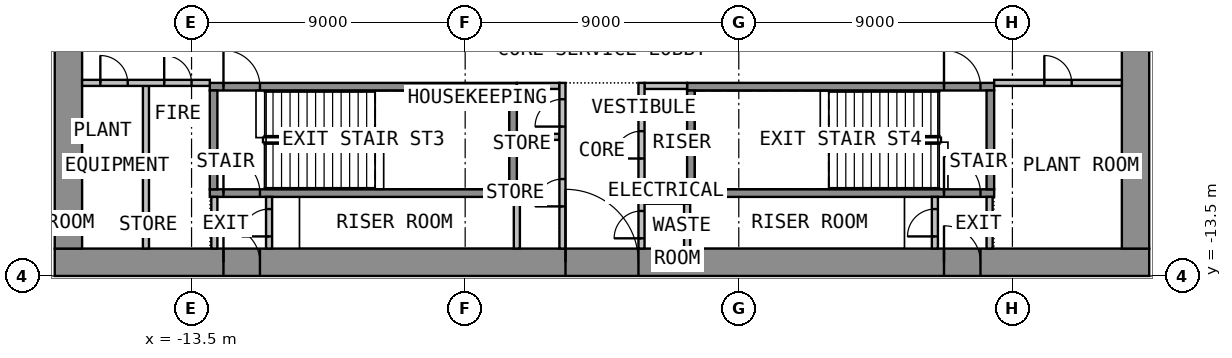
"""IFC4 building model, lengths in metres.
Left out: names, types, materials, properties, quantities, classifications, styles, units other than length and angle.
Written with IfcOpenShell. Run it as: python <this file> out.ifc"""

import sys

from ifc_helpers import new_model, si_unit, direction, frame, frame_2d, origin, place, context, subcontext, project, spatial, rectangle, extrude, element, fill, save


model = new_model("IFC4")
c1 = context("Model", 3, precision=1e-05, world=origin(), true_north=direction((0.0, 1.0)))
c2 = subcontext(c1, "Body", "Model", "MODEL_VIEW")
j1 = project(units=[si_unit("LENGTHUNIT", "METRE"), si_unit("PLANEANGLEUNIT", "RADIAN")], contexts=[c1])
p1 = place(None, origin())
s1 = spatial("IfcSite", under=j1, at=p1, CompositionType="ELEMENT")
p2 = place(p1, origin())
s2 = spatial("IfcBuilding", under=s1, at=p2, CompositionType="ELEMENT")
p3 = place(p2, frame((0.0, 0.0, 6.0)))
s3 = spatial("IfcBuildingStorey", under=s2, at=p3, CompositionType="ELEMENT", Elevation=6.0)
p4 = place(p3, frame((-18.0, -13.05, 0.0), z_axis=(0.0, 0.0, 1.0), x_axis=(1.0, 0.0, 0.0)))
e1 = element("IfcWall", 1, at=p4, inside=s3, PredefinedType="SHEAR", context=c2, shape_type="SweptSolid", body=[
    extrude(rectangle(XDim=36.0, YDim=0.9, at=frame_2d((18.0, 0.0))), origin(), (0.0, 0.0, 1.0), 4.4),
])
p5 = place(p4, frame((16.8, 0.0, 0.0)))
e2 = element("IfcOpeningElement", 2, at=p5, cuts=e1, PredefinedType="OPENING", context=c2, shape_type="SweptSolid", body=[
    extrude(rectangle(XDim=2.4, YDim=2.1, at=frame_2d((1.2, 1.05))), frame((0.0, 0.46, 0.0), z_axis=(0.0, -1.0, 0.0), x_axis=(1.0, 0.0, 0.0)), (0.0, 0.0, 1.0), 0.92),
])
p6 = place(p4, frame((5.55, 0.0, 0.0)))
e3 = element("IfcOpeningElement", 3, at=p6, cuts=e1, PredefinedType="OPENING", context=c2, shape_type="SweptSolid", body=[
    extrude(rectangle(XDim=1.2, YDim=2.1, at=frame_2d((0.6, 1.05))), frame((0.0, 0.46, 0.0), z_axis=(0.0, -1.0, 0.0), x_axis=(1.0, 0.0, 0.0)), (0.0, 0.0, 1.0), 0.92),
])
p7 = place(p4, frame((29.25, 0.0, 0.0)))
e4 = element("IfcOpeningElement", 4, at=p7, cuts=e1, PredefinedType="OPENING", context=c2, shape_type="SweptSolid", body=[
    extrude(rectangle(XDim=1.2, YDim=2.1, at=frame_2d((0.6, 1.05))), frame((0.0, 0.46, 0.0), z_axis=(0.0, -1.0, 0.0), x_axis=(1.0, 0.0, 0.0)), (0.0, 0.0, 1.0), 0.92),
])
p8 = place(p3, frame((-17.55, -12.6, 0.0), z_axis=(0.0, 0.0, 1.0), x_axis=(0.0, 1.0, 0.0)))
e5 = element("IfcWall", 5, at=p8, inside=s3, PredefinedType="SHEAR", context=c2, shape_type="SweptSolid", body=[
    extrude(rectangle(XDim=25.2, YDim=0.9, at=frame_2d((12.6, 0.0))), origin(), (0.0, 0.0, 1.0), 4.4),
])
p9 = place(p8, frame((11.4, 0.0, 0.0)))
e6 = element("IfcOpeningElement", 6, at=p9, cuts=e5, PredefinedType="OPENING", context=c2, shape_type="SweptSolid", body=[
    extrude(rectangle(XDim=2.4, YDim=2.1, at=frame_2d((1.2, 1.05))), frame((0.0, 0.46, 0.0), z_axis=(0.0, -1.0, 0.0), x_axis=(1.0, 0.0, 0.0)), (0.0, 0.0, 1.0), 0.92),
])
p10 = place(p3, frame((17.55, -12.6, 0.0), z_axis=(0.0, 0.0, 1.0), x_axis=(0.0, 1.0, 0.0)))
e7 = element("IfcWall", 7, at=p10, inside=s3, PredefinedType="SHEAR", context=c2, shape_type="SweptSolid", body=[
    extrude(rectangle(XDim=25.2, YDim=0.9, at=frame_2d((12.6, 0.0))), origin(), (0.0, 0.0, 1.0), 4.4),
])
p11 = place(p10, frame((11.4, 0.0, 0.0)))
e8 = element("IfcOpeningElement", 8, at=p11, cuts=e7, PredefinedType="OPENING", context=c2, shape_type="SweptSolid", body=[
    extrude(rectangle(XDim=2.4, YDim=2.1, at=frame_2d((1.2, 1.05))), frame((0.0, 0.46, 0.0), z_axis=(0.0, -1.0, 0.0), x_axis=(1.0, 0.0, 0.0)), (0.0, 0.0, 1.0), 0.92),
])
p12 = place(p3, frame((-12.9, -10.775, 0.0), z_axis=(0.0, 0.0, 1.0), x_axis=(1.0, 0.0, 0.0)))
e9 = element("IfcWall", 9, at=p12, inside=s3, PredefinedType="SHEAR", context=c2, shape_type="SweptSolid", body=[
    extrude(rectangle(XDim=10.1, YDim=0.25, at=frame_2d((5.05, 0.0))), origin(), (0.0, 0.0, 1.0), 4.4),
])
p13 = place(p12, frame((0.45, 0.0, 0.0)))
e10 = element("IfcOpeningElement", 10, at=p13, cuts=e9, PredefinedType="OPENING", context=c2, shape_type="SweptSolid", body=[
    extrude(rectangle(XDim=1.2, YDim=2.1, at=frame_2d((0.6, 1.05))), frame((0.0, 0.135, 0.0), z_axis=(0.0, -1.0, 0.0), x_axis=(1.0, 0.0, 0.0)), (0.0, 0.0, 1.0), 0.27),
])
p14 = place(p3, frame((-12.9, -7.275, 0.0), z_axis=(0.0, 0.0, 1.0), x_axis=(1.0, 0.0, 0.0)))
e11 = element("IfcWall", 11, at=p14, inside=s3, PredefinedType="SHEAR", context=c2, shape_type="SweptSolid", body=[
    extrude(rectangle(XDim=10.1, YDim=0.25, at=frame_2d((5.05, 0.0))), origin(), (0.0, 0.0, 1.0), 4.4),
])
p15 = place(p14, frame((0.45, 0.0, 0.0)))
e12 = element("IfcOpeningElement", 12, at=p15, cuts=e11, PredefinedType="OPENING", context=c2, shape_type="SweptSolid", body=[
    extrude(rectangle(XDim=1.2, YDim=2.1, at=frame_2d((0.6, 1.05))), frame((0.0, 0.135, 0.0), z_axis=(0.0, -1.0, 0.0), x_axis=(1.0, 0.0, 0.0)), (0.0, 0.0, 1.0), 0.27),
])
for number, where, z_axis, x_axis in (
    (13, (-12.775, -10.65, 0.0), (0.0, 0.0, 1.0), (0.0, 1.0, 0.0)),
    (14, (-2.925, -10.65, 0.0), (0.0, 0.0, 1.0), (0.0, 1.0, 0.0)),
):
    element("IfcWall", number, at=place(p3, frame(where, z_axis=z_axis, x_axis=x_axis)), inside=s3, PredefinedType="SHEAR", context=c2, shape_type="SweptSolid", body=[
        extrude(rectangle(XDim=3.25, YDim=0.25, at=frame_2d((1.625, 0.0))), origin(), (0.0, 0.0, 1.0), 4.4),
    ])
p16 = place(p3, frame((2.8, -10.775, 0.0), z_axis=(0.0, 0.0, 1.0), x_axis=(1.0, 0.0, 0.0)))
e15 = element("IfcWall", 15, at=p16, inside=s3, PredefinedType="SHEAR", context=c2, shape_type="SweptSolid", body=[
    extrude(rectangle(XDim=10.1, YDim=0.25, at=frame_2d((5.05, 0.0))), origin(), (0.0, 0.0, 1.0), 4.4),
])
p17 = place(p16, frame((8.45, 0.0, 0.0)))
e16 = element("IfcOpeningElement", 16, at=p17, cuts=e15, PredefinedType="OPENING", context=c2, shape_type="SweptSolid", body=[
    extrude(rectangle(XDim=1.2, YDim=2.1, at=frame_2d((0.6, 1.05))), frame((0.0, 0.135, 0.0), z_axis=(0.0, -1.0, 0.0), x_axis=(1.0, 0.0, 0.0)), (0.0, 0.0, 1.0), 0.27),
])
p18 = place(p3, frame((2.8, -7.275, 0.0), z_axis=(0.0, 0.0, 1.0), x_axis=(1.0, 0.0, 0.0)))
e17 = element("IfcWall", 17, at=p18, inside=s3, PredefinedType="SHEAR", context=c2, shape_type="SweptSolid", body=[
    extrude(rectangle(XDim=10.1, YDim=0.25, at=frame_2d((5.05, 0.0))), origin(), (0.0, 0.0, 1.0), 4.4),
])
p19 = place(p18, frame((8.45, 0.0, 0.0)))
e18 = element("IfcOpeningElement", 18, at=p19, cuts=e17, PredefinedType="OPENING", context=c2, shape_type="SweptSolid", body=[
    extrude(rectangle(XDim=1.2, YDim=2.1, at=frame_2d((0.6, 1.05))), frame((0.0, 0.135, 0.0), z_axis=(0.0, -1.0, 0.0), x_axis=(1.0, 0.0, 0.0)), (0.0, 0.0, 1.0), 0.27),
])
for number, where, z_axis, x_axis in (
    (19, (2.925, -10.65, 0.0), (0.0, 0.0, 1.0), (0.0, 1.0, 0.0)),
    (20, (12.775, -10.65, 0.0), (0.0, 0.0, 1.0), (0.0, 1.0, 0.0)),
):
    element("IfcWall", number, at=place(p3, frame(where, z_axis=z_axis, x_axis=x_axis)), inside=s3, PredefinedType="SHEAR", context=c2, shape_type="SweptSolid", body=[
        extrude(rectangle(XDim=3.25, YDim=0.25, at=frame_2d((1.625, 0.0))), origin(), (0.0, 0.0, 1.0), 4.4),
    ])
for number, where, z_axis, x_axis in (
    (21, (-2.8, -7.25, 0.0), (0.0, 0.0, 1.0), (1.0, 0.0, 0.0)),
    (22, (-2.8, -8.925, 0.0), (0.0, 0.0, 1.0), (1.0, 0.0, 0.0)),
    (23, (1.4, -7.25, 0.0), (0.0, 0.0, 1.0), (1.0, 0.0, 0.0)),
    (24, (1.4, -11.025, 0.0), (0.0, 0.0, 1.0), (1.0, 0.0, 0.0)),
):
    element("IfcWall", number, at=place(p3, frame(where, z_axis=z_axis, x_axis=x_axis)), inside=s3, PredefinedType="PARTITIONING", context=c2, shape_type="SweptSolid", body=[
        extrude(rectangle(XDim=1.4, YDim=0.2, at=frame_2d((0.7, 0.0))), origin(), (0.0, 0.0, 1.0), 4.4),
    ])
p20 = place(p3, frame((-1.3, -12.6, 0.0), z_axis=(0.0, 0.0, 1.0), x_axis=(0.0, 1.0, 0.0)))
e25 = element("IfcWall", 25, at=p20, inside=s3, PredefinedType="PARTITIONING", context=c2, shape_type="SweptSolid", body=[
    extrude(rectangle(XDim=5.45, YDim=0.2, at=frame_2d((2.725, 0.0))), origin(), (0.0, 0.0, 1.0), 4.4),
])
p21 = place(p20, frame((1.387, 0.0, 0.0)))
e26 = element("IfcOpeningElement", 26, at=p21, cuts=e25, PredefinedType="OPENING", context=c2, shape_type="SweptSolid", body=[
    extrude(rectangle(XDim=0.9, YDim=2.1, at=frame_2d((0.45, 1.05))), frame((0.0, 0.11, 0.0), z_axis=(0.0, -1.0, 0.0), x_axis=(1.0, 0.0, 0.0)), (0.0, 0.0, 1.0), 0.22),
])
p22 = place(p20, frame((4.012, 0.0, 0.0)))
e27 = element("IfcOpeningElement", 27, at=p22, cuts=e25, PredefinedType="OPENING", context=c2, shape_type="SweptSolid", body=[
    extrude(rectangle(XDim=0.9, YDim=2.1, at=frame_2d((0.45, 1.05))), frame((0.0, 0.11, 0.0), z_axis=(0.0, -1.0, 0.0), x_axis=(1.0, 0.0, 0.0)), (0.0, 0.0, 1.0), 0.22),
])
p23 = place(p3, frame((1.3, -12.6, 0.0), z_axis=(0.0, 0.0, 1.0), x_axis=(0.0, 1.0, 0.0)))
e28 = element("IfcWall", 28, at=p23, inside=s3, PredefinedType="PARTITIONING", context=c2, shape_type="SweptSolid", body=[
    extrude(rectangle(XDim=5.45, YDim=0.2, at=frame_2d((2.725, 0.0))), origin(), (0.0, 0.0, 1.0), 4.4),
])
p24 = place(p23, frame((0.337, 0.0, 0.0)))
e29 = element("IfcOpeningElement", 29, at=p24, cuts=e28, PredefinedType="OPENING", context=c2, shape_type="SweptSolid", body=[
    extrude(rectangle(XDim=0.9, YDim=2.1, at=frame_2d((0.45, 1.05))), frame((0.0, 0.11, 0.0), z_axis=(0.0, -1.0, 0.0), x_axis=(1.0, 0.0, 0.0)), (0.0, 0.0, 1.0), 0.22),
])
p25 = place(p23, frame((2.962, 0.0, 0.0)))
e30 = element("IfcOpeningElement", 30, at=p25, cuts=e28, PredefinedType="OPENING", context=c2, shape_type="SweptSolid", body=[
    extrude(rectangle(XDim=0.9, YDim=2.1, at=frame_2d((0.45, 1.05))), frame((0.0, 0.11, 0.0), z_axis=(0.0, -1.0, 0.0), x_axis=(1.0, 0.0, 0.0)), (0.0, 0.0, 1.0), 0.22),
])
p26 = place(p3, frame((-12.75, -12.6, 0.0), z_axis=(0.0, 0.0, 1.0), x_axis=(0.0, 1.0, 0.0)))
e31 = element("IfcWall", 31, at=p26, inside=s3, PredefinedType="PARTITIONING", context=c2, shape_type="SweptSolid", body=[
    extrude(rectangle(XDim=1.7, YDim=0.2, at=frame_2d((0.85, 0.0))), origin(), (0.0, 0.0, 1.0), 4.4),
])
p27 = place(p3, frame((-10.95, -12.6, 0.0), z_axis=(0.0, 0.0, 1.0), x_axis=(0.0, 1.0, 0.0)))
e32 = element("IfcWall", 32, at=p27, inside=s3, PredefinedType="PARTITIONING", context=c2, shape_type="SweptSolid", body=[
    extrude(rectangle(XDim=1.7, YDim=0.2, at=frame_2d((0.85, 0.0))), origin(), (0.0, 0.0, 1.0), 4.4),
])
p28 = place(p27, frame((0.4, 0.0, 0.0)))
e33 = element("IfcOpeningElement", 33, at=p28, cuts=e32, PredefinedType="OPENING", context=c2, shape_type="SweptSolid", body=[
    extrude(rectangle(XDim=0.9, YDim=2.1, at=frame_2d((0.45, 1.05))), frame((0.0, 0.11, 0.0), z_axis=(0.0, -1.0, 0.0), x_axis=(1.0, 0.0, 0.0)), (0.0, 0.0, 1.0), 0.22),
])
p29 = place(p3, frame((12.75, -12.6, 0.0), z_axis=(0.0, 0.0, 1.0), x_axis=(0.0, 1.0, 0.0)))
e34 = element("IfcWall", 34, at=p29, inside=s3, PredefinedType="PARTITIONING", context=c2, shape_type="SweptSolid", body=[
    extrude(rectangle(XDim=1.7, YDim=0.2, at=frame_2d((0.85, 0.0))), origin(), (0.0, 0.0, 1.0), 4.4),
])
p30 = place(p3, frame((10.95, -12.6, 0.0), z_axis=(0.0, 0.0, 1.0), x_axis=(0.0, 1.0, 0.0)))
e35 = element("IfcWall", 35, at=p30, inside=s3, PredefinedType="PARTITIONING", context=c2, shape_type="SweptSolid", body=[
    extrude(rectangle(XDim=1.7, YDim=0.2, at=frame_2d((0.85, 0.0))), origin(), (0.0, 0.0, 1.0), 4.4),
])
p31 = place(p30, frame((0.4, 0.0, 0.0)))
e36 = element("IfcOpeningElement", 36, at=p31, cuts=e35, PredefinedType="OPENING", context=c2, shape_type="SweptSolid", body=[
    extrude(rectangle(XDim=0.9, YDim=2.1, at=frame_2d((0.45, 1.05))), frame((0.0, 0.11, 0.0), z_axis=(0.0, -1.0, 0.0), x_axis=(1.0, 0.0, 0.0)), (0.0, 0.0, 1.0), 0.22),
])
p32 = place(p3, frame((-15.0, -12.6, 0.0), z_axis=(0.0, 0.0, 1.0), x_axis=(0.0, 1.0, 0.0)))
e37 = element("IfcWall", 37, at=p32, inside=s3, PredefinedType="PARTITIONING", context=c2, shape_type="SweptSolid", body=[
    extrude(rectangle(XDim=5.45, YDim=0.2, at=frame_2d((2.725, 0.0))), origin(), (0.0, 0.0, 1.0), 4.4),
])
p33 = place(p3, frame((-17.1, -7.15, 0.0), z_axis=(0.0, 0.0, 1.0), x_axis=(1.0, 0.0, 0.0)))
e38 = element("IfcWall", 38, at=p33, inside=s3, PredefinedType="PARTITIONING", context=c2, shape_type="SweptSolid", body=[
    extrude(rectangle(XDim=4.2, YDim=0.2, at=frame_2d((2.1, 0.0))), origin(), (0.0, 0.0, 1.0), 4.4),
])
p34 = place(p33, frame((0.6, 0.0, 0.0)))
e39 = element("IfcOpeningElement", 39, at=p34, cuts=e38, PredefinedType="OPENING", context=c2, shape_type="SweptSolid", body=[
    extrude(rectangle(XDim=0.9, YDim=2.1, at=frame_2d((0.45, 1.05))), frame((0.0, 0.11, 0.0), z_axis=(0.0, -1.0, 0.0), x_axis=(1.0, 0.0, 0.0)), (0.0, 0.0, 1.0), 0.22),
])
p35 = place(p33, frame((2.7, 0.0, 0.0)))
e40 = element("IfcOpeningElement", 40, at=p35, cuts=e38, PredefinedType="OPENING", context=c2, shape_type="SweptSolid", body=[
    extrude(rectangle(XDim=0.9, YDim=2.1, at=frame_2d((0.45, 1.05))), frame((0.0, 0.11, 0.0), z_axis=(0.0, -1.0, 0.0), x_axis=(1.0, 0.0, 0.0)), (0.0, 0.0, 1.0), 0.22),
])
p36 = place(p3, frame((12.9, -7.15, 0.0), z_axis=(0.0, 0.0, 1.0), x_axis=(1.0, 0.0, 0.0)))
e41 = element("IfcWall", 41, at=p36, inside=s3, PredefinedType="PARTITIONING", context=c2, shape_type="SweptSolid", body=[
    extrude(rectangle(XDim=4.2, YDim=0.2, at=frame_2d((2.1, 0.0))), origin(), (0.0, 0.0, 1.0), 4.4),
])
p37 = place(p36, frame((1.65, 0.0, 0.0)))
e42 = element("IfcOpeningElement", 42, at=p37, cuts=e41, PredefinedType="OPENING", context=c2, shape_type="SweptSolid", body=[
    extrude(rectangle(XDim=0.9, YDim=2.1, at=frame_2d((0.45, 1.05))), frame((0.0, 0.11, 0.0), z_axis=(0.0, -1.0, 0.0), x_axis=(1.0, 0.0, 0.0)), (0.0, 0.0, 1.0), 0.22),
])
p38 = place(p3, frame((-2.8, -12.599, 0.0), z_axis=(0.0, 0.0, 1.0), x_axis=(0.0, 1.0, 0.0)))
e43 = element("IfcWall", 43, at=p38, inside=s3, PredefinedType="PARTITIONING", context=c2, shape_type="SweptSolid", body=[
    extrude(rectangle(XDim=1.698, YDim=0.2, at=frame_2d((0.849, 0.0))), origin(), (0.0, 0.0, 1.0), 4.4),
])
p39 = place(p3, frame((2.8, -11.126, 0.0), z_axis=(0.0, 0.0, 1.0), x_axis=(0.0, -1.0, 0.0)))
e44 = element("IfcWall", 44, at=p39, inside=s3, PredefinedType="PARTITIONING", context=c2, shape_type="SweptSolid", body=[
    extrude(rectangle(XDim=1.473, YDim=0.2, at=frame_2d((0.737, 0.0))), origin(), (0.0, 0.0, 1.0), 4.4),
])
p40 = place(p5, origin())
e45 = element("IfcDoor", 45, at=p40, inside=s3, OperationType="DOUBLE_DOOR_DOUBLE_SWING", PredefinedType="DOOR", context=c2, shape_type="SweptSolid", body=[
    extrude(rectangle(XDim=2.4, YDim=2.1, at=frame_2d((1.2, 1.05))), frame((0.0, 0.025, 0.0), z_axis=(0.0, -1.0, 0.0), x_axis=(1.0, 0.0, 0.0)), (0.0, 0.0, 1.0), 0.05),
])
fill(e2, e45)
p41 = place(p6, origin())
e46 = element("IfcDoor", 46, at=p41, inside=s3, OperationType="SINGLE_SWING_RIGHT", PredefinedType="DOOR", context=c2, shape_type="SweptSolid", body=[
    extrude(rectangle(XDim=1.2, YDim=2.1, at=frame_2d((0.6, 1.05))), frame((0.0, 0.025, 0.0), z_axis=(0.0, -1.0, 0.0), x_axis=(1.0, 0.0, 0.0)), (0.0, 0.0, 1.0), 0.05),
])
fill(e3, e46)
p42 = place(p7, origin())
e47 = element("IfcDoor", 47, at=p42, inside=s3, OperationType="SINGLE_SWING_RIGHT", PredefinedType="DOOR", context=c2, shape_type="SweptSolid", body=[
    extrude(rectangle(XDim=1.2, YDim=2.1, at=frame_2d((0.6, 1.05))), frame((0.0, 0.025, 0.0), z_axis=(0.0, -1.0, 0.0), x_axis=(1.0, 0.0, 0.0)), (0.0, 0.0, 1.0), 0.05),
])
fill(e4, e47)
p43 = place(p15, origin())
e48 = element("IfcDoor", 48, at=p43, inside=s3, OperationType="SINGLE_SWING_LEFT", PredefinedType="DOOR", context=c2, shape_type="SweptSolid", body=[
    extrude(rectangle(XDim=1.2, YDim=2.1, at=frame_2d((0.6, 1.05))), frame((0.0, 0.025, 0.0), z_axis=(0.0, -1.0, 0.0), x_axis=(1.0, 0.0, 0.0)), (0.0, 0.0, 1.0), 0.05),
])
fill(e12, e48)
p44 = place(p19, origin())
e49 = element("IfcDoor", 49, at=p44, inside=s3, OperationType="SINGLE_SWING_LEFT", PredefinedType="DOOR", context=c2, shape_type="SweptSolid", body=[
    extrude(rectangle(XDim=1.2, YDim=2.1, at=frame_2d((0.6, 1.05))), frame((0.0, 0.025, 0.0), z_axis=(0.0, -1.0, 0.0), x_axis=(1.0, 0.0, 0.0)), (0.0, 0.0, 1.0), 0.05),
])
fill(e18, e49)
p45 = place(p21, origin())
e50 = element("IfcDoor", 50, at=p45, inside=s3, OperationType="SINGLE_SWING_LEFT", PredefinedType="DOOR", context=c2, shape_type="SweptSolid", body=[
    extrude(rectangle(XDim=0.9, YDim=2.1, at=frame_2d((0.45, 1.05))), frame((0.0, 0.025, 0.0), z_axis=(0.0, -1.0, 0.0), x_axis=(1.0, 0.0, 0.0)), (0.0, 0.0, 1.0), 0.05),
])
fill(e26, e50)
p46 = place(p22, origin())
e51 = element("IfcDoor", 51, at=p46, inside=s3, OperationType="SINGLE_SWING_LEFT", PredefinedType="DOOR", context=c2, shape_type="SweptSolid", body=[
    extrude(rectangle(XDim=0.9, YDim=2.1, at=frame_2d((0.45, 1.05))), frame((0.0, 0.025, 0.0), z_axis=(0.0, -1.0, 0.0), x_axis=(1.0, 0.0, 0.0)), (0.0, 0.0, 1.0), 0.05),
])
fill(e27, e51)
p47 = place(p24, origin())
e52 = element("IfcDoor", 52, at=p47, inside=s3, OperationType="SINGLE_SWING_LEFT", PredefinedType="DOOR", context=c2, shape_type="SweptSolid", body=[
    extrude(rectangle(XDim=0.9, YDim=2.1, at=frame_2d((0.45, 1.05))), frame((0.0, 0.025, 0.0), z_axis=(0.0, -1.0, 0.0), x_axis=(1.0, 0.0, 0.0)), (0.0, 0.0, 1.0), 0.05),
])
fill(e29, e52)
p48 = place(p25, origin())
e53 = element("IfcDoor", 53, at=p48, inside=s3, OperationType="SINGLE_SWING_LEFT", PredefinedType="DOOR", context=c2, shape_type="SweptSolid", body=[
    extrude(rectangle(XDim=0.9, YDim=2.1, at=frame_2d((0.45, 1.05))), frame((0.0, 0.025, 0.0), z_axis=(0.0, -1.0, 0.0), x_axis=(1.0, 0.0, 0.0)), (0.0, 0.0, 1.0), 0.05),
])
fill(e30, e53)
p49 = place(p13, origin())
e54 = element("IfcDoor", 54, at=p49, inside=s3, OperationType="SINGLE_SWING_RIGHT", PredefinedType="DOOR", context=c2, shape_type="SweptSolid", body=[
    extrude(rectangle(XDim=1.2, YDim=2.1, at=frame_2d((0.6, 1.05))), frame((0.0, 0.025, 0.0), z_axis=(0.0, -1.0, 0.0), x_axis=(1.0, 0.0, 0.0)), (0.0, 0.0, 1.0), 0.05),
])
fill(e10, e54)
p50 = place(p28, origin())
e55 = element("IfcDoor", 55, at=p50, inside=s3, OperationType="SINGLE_SWING_LEFT", PredefinedType="DOOR", context=c2, shape_type="SweptSolid", body=[
    extrude(rectangle(XDim=0.9, YDim=2.1, at=frame_2d((0.45, 1.05))), frame((0.0, 0.025, 0.0), z_axis=(0.0, -1.0, 0.0), x_axis=(1.0, 0.0, 0.0)), (0.0, 0.0, 1.0), 0.05),
])
fill(e33, e55)
p51 = place(p17, origin())
e56 = element("IfcDoor", 56, at=p51, inside=s3, OperationType="SINGLE_SWING_RIGHT", PredefinedType="DOOR", context=c2, shape_type="SweptSolid", body=[
    extrude(rectangle(XDim=1.2, YDim=2.1, at=frame_2d((0.6, 1.05))), frame((0.0, 0.025, 0.0), z_axis=(0.0, -1.0, 0.0), x_axis=(1.0, 0.0, 0.0)), (0.0, 0.0, 1.0), 0.05),
])
fill(e16, e56)
p52 = place(p31, origin())
e57 = element("IfcDoor", 57, at=p52, inside=s3, OperationType="SINGLE_SWING_LEFT", PredefinedType="DOOR", context=c2, shape_type="SweptSolid", body=[
    extrude(rectangle(XDim=0.9, YDim=2.1, at=frame_2d((0.45, 1.05))), frame((0.0, 0.025, 0.0), z_axis=(0.0, -1.0, 0.0), x_axis=(1.0, 0.0, 0.0)), (0.0, 0.0, 1.0), 0.05),
])
fill(e36, e57)
p53 = place(p34, origin())
e58 = element("IfcDoor", 58, at=p53, inside=s3, OperationType="SINGLE_SWING_LEFT", PredefinedType="DOOR", context=c2, shape_type="SweptSolid", body=[
    extrude(rectangle(XDim=0.9, YDim=2.1, at=frame_2d((0.45, 1.05))), frame((0.0, 0.025, 0.0), z_axis=(0.0, -1.0, 0.0), x_axis=(1.0, 0.0, 0.0)), (0.0, 0.0, 1.0), 0.05),
])
fill(e39, e58)
p54 = place(p35, origin())
e59 = element("IfcDoor", 59, at=p54, inside=s3, OperationType="SINGLE_SWING_LEFT", PredefinedType="DOOR", context=c2, shape_type="SweptSolid", body=[
    extrude(rectangle(XDim=0.9, YDim=2.1, at=frame_2d((0.45, 1.05))), frame((0.0, 0.025, 0.0), z_axis=(0.0, -1.0, 0.0), x_axis=(1.0, 0.0, 0.0)), (0.0, 0.0, 1.0), 0.05),
])
fill(e40, e59)
p55 = place(p37, origin())
e60 = element("IfcDoor", 60, at=p55, inside=s3, OperationType="SINGLE_SWING_LEFT", PredefinedType="DOOR", context=c2, shape_type="SweptSolid", body=[
    extrude(rectangle(XDim=0.9, YDim=2.1, at=frame_2d((0.45, 1.05))), frame((0.0, 0.025, 0.0), z_axis=(0.0, -1.0, 0.0), x_axis=(1.0, 0.0, 0.0)), (0.0, 0.0, 1.0), 0.05),
])
fill(e42, e60)
save(model, sys.argv[1])
